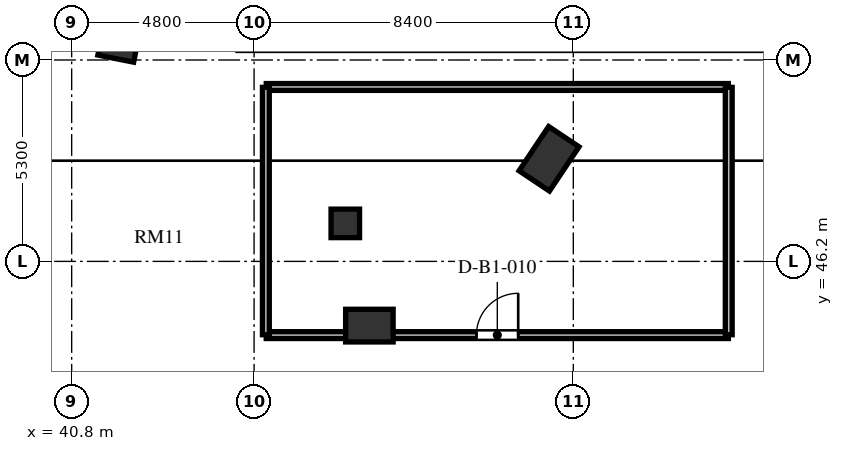
"""IFC4 building model, lengths in metres.
Left out: names, types, materials, properties, quantities, classifications, styles, units other than length and angle.
Written with IfcOpenShell. Run it as: python <this file> out.ifc"""

import sys

from ifc_helpers import new_model, si_unit, direction, frame, frame_2d, origin, origin_2d, place, context, subcontext, project, spatial, rectangle, extrude, element, fill, save


model = new_model("IFC4")
c1 = context("Model", 3, precision=1e-05, world=origin(), true_north=direction((0.0, 1.0)))
c2 = subcontext(c1, "Body", "Model", "MODEL_VIEW")
j1 = project(units=[si_unit("LENGTHUNIT", "METRE"), si_unit("PLANEANGLEUNIT", "RADIAN")], contexts=[c1])
p1 = place(None, origin())
s1 = spatial("IfcSite", under=j1, at=p1, CompositionType="ELEMENT")
p2 = place(p1, origin())
s2 = spatial("IfcBuilding", under=s1, at=p2, CompositionType="ELEMENT")
p3 = place(p2, frame((0.0, 0.0, -5.4)))
s3 = spatial("IfcBuildingStorey", under=s2, at=p3, CompositionType="ELEMENT", Elevation=-5.4)
for number, where, z_axis, x_axis in (
    (1, (53.362, 48.9, 0.0), (0.0, 0.0, 1.0), (0.556, 0.831, 0.0)),
    (2, (42.097, 52.222, 0.0), (0.0, 0.0, 1.0), (0.195, 0.981, 0.0)),
):
    element("IfcColumn", number, at=place(p3, frame(where, z_axis=z_axis, x_axis=x_axis)), inside=s3, PredefinedType="COLUMN", context=c2, shape_type="SweptSolid", body=[
        extrude(rectangle(XDim=1.4, YDim=0.96, at=origin_2d()), origin(), (0.0, 0.0, 1.0), 5.4),
    ])
p4 = place(p3, frame((48.634, 44.51, 0.0), z_axis=(0.0, 0.0, 1.0), x_axis=(1.0, 0.0, 0.0)))
e3 = element("IfcColumn", 3, at=p4, inside=s3, PredefinedType="COLUMN", context=c2, shape_type="SweptSolid", body=[
    extrude(rectangle(XDim=1.25, YDim=0.86, at=origin_2d()), origin(), (0.0, 0.0, 1.0), 5.4),
])
p5 = place(p3, frame((48.0, 47.2, 0.0), z_axis=(0.0, 0.0, 1.0), x_axis=(1.0, 0.0, 0.0)))
e4 = element("IfcColumn", 4, at=p5, inside=s3, PredefinedType="COLUMN", context=c2, shape_type="SweptSolid", body=[
    extrude(rectangle(XDim=0.75, YDim=0.75, at=origin_2d()), origin(), (0.0, 0.0, 1.0), 5.4),
])
p6 = place(p3, frame((45.92, 50.79, 0.0), z_axis=(0.0, 0.0, 1.0), x_axis=(1.0, 0.0, 0.0)))
e5 = element("IfcWall", 5, at=p6, inside=s3, PredefinedType="PARTITIONING", context=c2, shape_type="SweptSolid", body=[
    extrude(rectangle(XDim=12.16, YDim=0.18, at=frame_2d((6.08, 0.0))), origin(), (0.0, 0.0, 1.0), 5.12),
])
p7 = place(p3, frame((45.92, 44.26, 0.0), z_axis=(0.0, 0.0, 1.0), x_axis=(1.0, 0.0, 0.0)))
e6 = element("IfcWall", 6, at=p7, inside=s3, PredefinedType="PARTITIONING", context=c2, shape_type="SweptSolid", body=[
    extrude(rectangle(XDim=12.16, YDim=0.18, at=frame_2d((6.08, 0.0))), origin(), (0.0, 0.0, 1.0), 5.12),
])
p8 = place(p7, frame((5.53, 0.0, 0.0)))
e7 = element("IfcOpeningElement", 7, at=p8, cuts=e6, PredefinedType="OPENING", context=c2, shape_type="SweptSolid", body=[
    extrude(rectangle(XDim=1.1, YDim=2.15, at=frame_2d((0.55, 1.075))), frame((0.0, 0.1, 0.0), z_axis=(0.0, -1.0, 0.0), x_axis=(1.0, 0.0, 0.0)), (0.0, 0.0, 1.0), 0.2),
])
for number, where, z_axis, x_axis in (
    (8, (58.09, 44.27, 0.0), (0.0, 0.0, 1.0), (0.0, 1.0, 0.0)),
    (9, (45.91, 44.27, 0.0), (0.0, 0.0, 1.0), (0.0, 1.0, 0.0)),
):
    element("IfcWall", number, at=place(p3, frame(where, z_axis=z_axis, x_axis=x_axis)), inside=s3, PredefinedType="PARTITIONING", context=c2, shape_type="SweptSolid", body=[
        extrude(rectangle(XDim=6.51, YDim=0.18, at=frame_2d((3.255, 0.0))), origin(), (0.0, 0.0, 1.0), 5.12),
    ])
p9 = place(p8, origin())
e10 = element("IfcDoor", 10, at=p9, inside=s3, OperationType="SINGLE_SWING_RIGHT", PredefinedType="DOOR", context=c2, shape_type="SweptSolid", body=[
    extrude(rectangle(XDim=1.1, YDim=2.15, at=frame_2d((0.55, 1.075))), frame((0.0, 0.025, 0.0), z_axis=(0.0, -1.0, 0.0), x_axis=(1.0, 0.0, 0.0)), (0.0, 0.0, 1.0), 0.05),
])
fill(e7, e10)
save(model, sys.argv[1])
